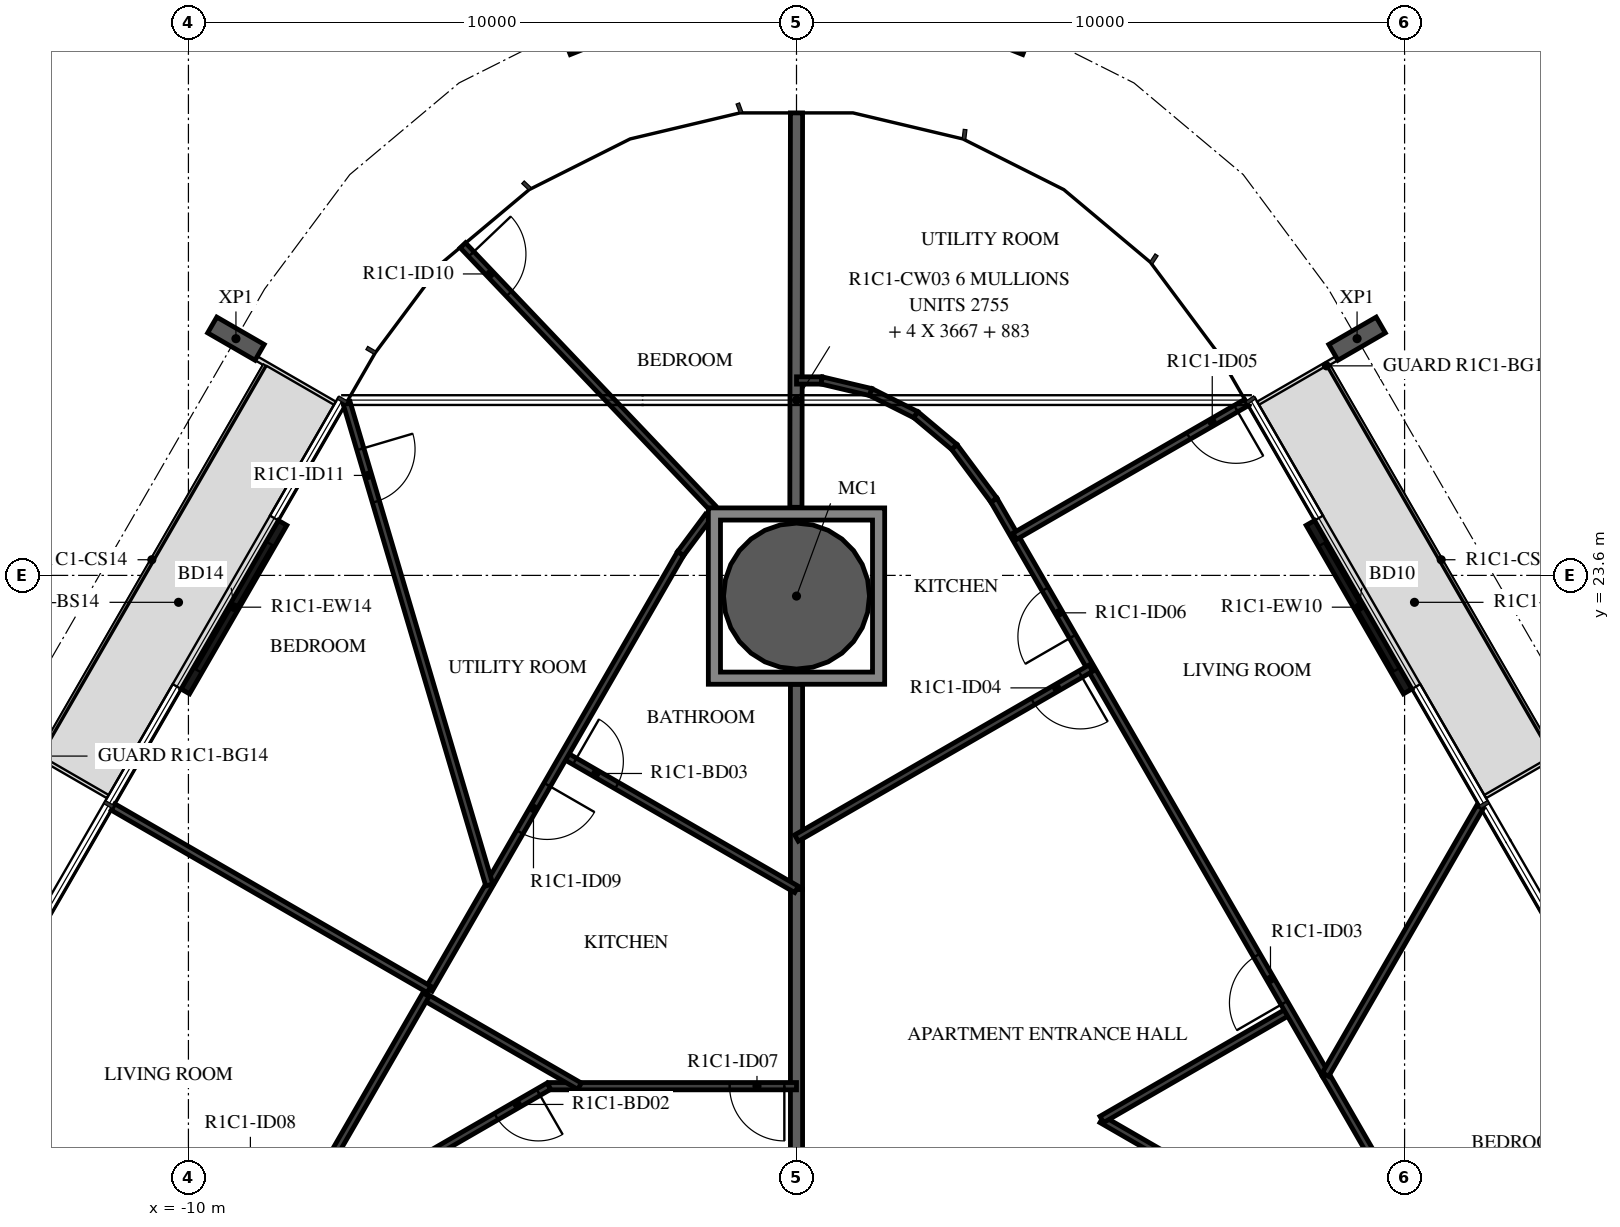
"""IFC4 building model, lengths in metres.
Left out: names, types, materials, properties, quantities, classifications, styles, units other than length and angle.
Written with IfcOpenShell. Run it as: python <this file> out.ifc"""

import sys

from ifc_helpers import new_model, si_unit, direction, frame, frame_2d, origin, origin_2d, place, context, subcontext, project, spatial, polyline, rectangle, hollow_circle, i_section, outline, extrude, element, fill, save


model = new_model("IFC4")
c1 = context("Model", 3, precision=1e-05, world=origin(), true_north=direction((0.0, 1.0)))
c2 = subcontext(c1, "Body", "Model", "MODEL_VIEW")
j1 = project(units=[si_unit("LENGTHUNIT", "METRE"), si_unit("PLANEANGLEUNIT", "RADIAN")], contexts=[c1])
p1 = place(None, origin())
s1 = spatial("IfcSite", under=j1, at=p1, CompositionType="ELEMENT")
p2 = place(p1, origin())
s2 = spatial("IfcBuilding", under=s1, at=p2, CompositionType="ELEMENT")
p3 = place(p2, frame((0.0, 0.0, 62.9)))
s3 = spatial("IfcBuildingStorey", under=s2, at=p3, CompositionType="ELEMENT", Elevation=62.9)
p4 = place(p3, frame((0.0, 23.26, -0.38), z_axis=(0.0, 0.0, 1.0), x_axis=(1.0, 0.0, 0.0)))
e1 = element("IfcColumn", 1, at=p4, inside=s3, PredefinedType="COLUMN", context=c2, shape_type="SweptSolid", body=[
    extrude(hollow_circle(Radius=1.2, WallThickness=0.06, at=origin_2d()), origin(), (0.0, 0.0, 1.0), 3.5),
])
for number, where, z_axis, x_axis in (
    (2, (9.219, 27.493, -0.38), (0.0, 0.0, 1.0), (0.5, -0.866, 0.0)),
    (3, (3.748, 32.639, -0.38), (0.0, 0.0, 1.0), (0.929, -0.371, 0.0)),
    (4, (-3.748, 32.639, -0.38), (0.0, 0.0, 1.0), (0.929, 0.371, 0.0)),
    (5, (-9.219, 27.493, -0.38), (0.0, 0.0, 1.0), (0.5, 0.866, 0.0)),
):
    element("IfcColumn", number, at=place(p3, frame(where, z_axis=z_axis, x_axis=x_axis)), inside=s3, PredefinedType="COLUMN", context=c2, shape_type="SweptSolid", body=[
        extrude(i_section(OverallWidth=0.3, OverallDepth=0.9, WebThickness=0.019, FlangeThickness=0.035, FilletRadius=0.03, at=origin_2d()), origin(), (0.0, 0.0, 1.0), 3.5),
    ])
p5 = place(p3, frame((10.051, 21.692, 0.0), z_axis=(0.0, 0.0, 1.0), x_axis=(-0.499971222258, 0.866042017984, 0.0)))
e6 = element("IfcWall", 6, at=p5, inside=s3, PredefinedType="STANDARD", context=c2, shape_type="SweptSolid", body=[
    extrude(rectangle(XDim=3.2, YDim=0.16, at=frame_2d((1.6, 0.0))), origin(), (0.0, 0.0, 1.0), 3.12),
])
p6 = place(p5, frame((0.4, 0.0, 0.0)))
e7 = element("IfcOpeningElement", 7, at=p6, cuts=e6, PredefinedType="OPENING", context=c2, shape_type="SweptSolid", body=[
    extrude(rectangle(XDim=2.4, YDim=2.4, at=frame_2d((1.2, 1.2))), frame((0.0, 0.09, 0.0), z_axis=(0.0, -1.0, 0.0), x_axis=(1.0, 0.0, 0.0)), (0.0, 0.0, 1.0), 0.18),
])
p7 = place(p3, frame((-8.451, 24.463, 0.0), z_axis=(0.0, 0.0, 1.0), x_axis=(-0.499971222258, -0.866042017984, 0.0)))
e8 = element("IfcWall", 8, at=p7, inside=s3, PredefinedType="STANDARD", context=c2, shape_type="SweptSolid", body=[
    extrude(rectangle(XDim=3.2, YDim=0.16, at=frame_2d((1.6, 0.0))), origin(), (0.0, 0.0, 1.0), 3.12),
])
p8 = place(p7, frame((0.4, 0.0, 0.0)))
e9 = element("IfcOpeningElement", 9, at=p8, cuts=e8, PredefinedType="OPENING", context=c2, shape_type="SweptSolid", body=[
    extrude(rectangle(XDim=2.4, YDim=2.4, at=frame_2d((1.2, 1.2))), frame((0.0, 0.09, 0.0), z_axis=(0.0, -1.0, 0.0), x_axis=(1.0, 0.0, 0.0)), (0.0, 0.0, 1.0), 0.18),
])
p9 = place(p3, frame((0.0, 18.437, 0.0), z_axis=(0.0, 0.0, 1.0), x_axis=(0.0, -1.0, 0.0)))
e10 = element("IfcWall", 10, at=p9, inside=s3, PredefinedType="STANDARD", context=c2, shape_type="SweptSolid", body=[
    extrude(rectangle(XDim=4.737, YDim=0.2, at=frame_2d((2.368, 0.0))), origin(), (0.0, 0.0, 1.0), 3.12),
])
p10 = place(p3, frame((0.0, 21.81, 0.0), z_axis=(0.0, 0.0, 1.0), x_axis=(0.0, -1.0, 0.0)))
e11 = element("IfcWall", 11, at=p10, inside=s3, PredefinedType="STANDARD", context=c2, shape_type="SweptSolid", body=[
    extrude(rectangle(XDim=3.373, YDim=0.2, at=frame_2d((1.687, 0.0))), origin(), (0.0, 0.0, 1.0), 3.12),
])
p11 = place(p3, frame((0.0, 31.206, 0.0), z_axis=(0.0, 0.0, 1.0), x_axis=(-0.001543266126, -0.999998809164, 0.0)))
e12 = element("IfcWall", 12, at=p11, inside=s3, PredefinedType="STANDARD", context=c2, shape_type="SweptSolid", body=[
    extrude(rectangle(XDim=6.486, YDim=0.2, at=frame_2d((3.243, 0.0))), origin(), (0.0, 0.0, 1.0), 3.12),
])
p12 = place(p3, frame((11.127, 11.127, 0.0), z_axis=(0.0, 0.0, 1.0), x_axis=(-0.86602299963, 0.500004164094, 0.0)))
e13 = element("IfcWall", 13, at=p12, inside=s3, PredefinedType="PARTITIONING", context=c2, shape_type="SweptSolid", body=[
    extrude(rectangle(XDim=7.052, YDim=0.12, at=frame_2d((3.526, 0.0))), origin(), (0.0, 0.0, 1.0), 3.12),
])
p13 = place(p12, frame((1.4, 0.0, 0.0)))
e14 = element("IfcOpeningElement", 14, at=p13, cuts=e13, PredefinedType="OPENING", context=c2, shape_type="SweptSolid", body=[
    extrude(rectangle(XDim=0.8, YDim=2.1, at=frame_2d((0.4, 1.05))), frame((0.0, 0.07, 0.0), z_axis=(0.0, -1.0, 0.0), x_axis=(1.0, 0.0, 0.0)), (0.0, 0.0, 1.0), 0.14),
])
p14 = place(p3, frame((5.02, 14.653, 0.0), z_axis=(0.0, 0.0, 1.0), x_axis=(0.866028940167, 0.499993874756, 0.0)))
e15 = element("IfcWall", 15, at=p14, inside=s3, PredefinedType="PARTITIONING", context=c2, shape_type="SweptSolid", body=[
    extrude(rectangle(XDim=3.556, YDim=0.12, at=frame_2d((1.778, 0.0))), origin(), (0.0, 0.0, 1.0), 3.12),
])
p15 = place(p3, frame((8.7, 15.392, 0.0), z_axis=(0.0, 0.0, 1.0), x_axis=(-0.500002742713, 0.866023820272, 0.0)))
e16 = element("IfcWall", 16, at=p15, inside=s3, PredefinedType="PARTITIONING", context=c2, shape_type="SweptSolid", body=[
    extrude(rectangle(XDim=10.908, YDim=0.12, at=frame_2d((5.454, 0.0))), origin(), (0.0, 0.0, 1.0), 3.12),
])
p16 = place(p15, frame((1.36, 0.0, 0.0)))
e17 = element("IfcOpeningElement", 17, at=p16, cuts=e16, PredefinedType="OPENING", context=c2, shape_type="SweptSolid", body=[
    extrude(rectangle(XDim=0.9, YDim=2.1, at=frame_2d((0.45, 1.05))), frame((0.0, 0.07, 0.0), z_axis=(0.0, -1.0, 0.0), x_axis=(1.0, 0.0, 0.0)), (0.0, 0.0, 1.0), 0.14),
])
p17 = place(p15, frame((8.317, 0.0, 0.0)))
e18 = element("IfcOpeningElement", 18, at=p17, cuts=e16, PredefinedType="OPENING", context=c2, shape_type="SweptSolid", body=[
    extrude(rectangle(XDim=0.9, YDim=2.1, at=frame_2d((0.45, 1.05))), frame((0.0, 0.07, 0.0), z_axis=(0.0, -1.0, 0.0), x_axis=(1.0, 0.0, 0.0)), (0.0, 0.0, 1.0), 0.14),
])
p18 = place(p3, frame((4.841, 22.075, 0.0), z_axis=(0.0, 0.0, 1.0), x_axis=(-0.866019751484, -0.500009789943, 0.0)))
e19 = element("IfcWall", 19, at=p18, inside=s3, PredefinedType="PARTITIONING", context=c2, shape_type="SweptSolid", body=[
    extrude(rectangle(XDim=5.59, YDim=0.12, at=frame_2d((2.795, 0.0))), origin(), (0.0, 0.0, 1.0), 3.12),
])
p19 = place(p18, frame((0.2, 0.0, 0.0)))
e20 = element("IfcOpeningElement", 20, at=p19, cuts=e19, PredefinedType="OPENING", context=c2, shape_type="SweptSolid", body=[
    extrude(rectangle(XDim=0.9, YDim=2.1, at=frame_2d((0.45, 1.05))), frame((0.0, 0.07, 0.0), z_axis=(0.0, -1.0, 0.0), x_axis=(1.0, 0.0, 0.0)), (0.0, 0.0, 1.0), 0.14),
])
p20 = place(p3, frame((8.7, 15.392, 0.0), z_axis=(0.0, 0.0, 1.0), x_axis=(0.499986106925, -0.866033424806, 0.0)))
e21 = element("IfcWall", 21, at=p20, inside=s3, PredefinedType="PARTITIONING", context=c2, shape_type="SweptSolid", body=[
    extrude(rectangle(XDim=5.317, YDim=0.12, at=frame_2d((2.659, 0.0))), origin(), (0.0, 0.0, 1.0), 3.12),
])
p21 = place(p3, frame((11.24, 19.792, 0.0), z_axis=(0.0, 0.0, 1.0), x_axis=(-0.499978956711, -0.866037552792, 0.0)))
e22 = element("IfcWall", 22, at=p21, inside=s3, PredefinedType="PARTITIONING", context=c2, shape_type="SweptSolid", body=[
    extrude(rectangle(XDim=5.081, YDim=0.12, at=frame_2d((2.541, 0.0))), origin(), (0.0, 0.0, 1.0), 3.12),
])
p22 = place(p3, frame((7.4, 26.443, 0.0), z_axis=(0.0, 0.0, 1.0), x_axis=(-0.866032203192, -0.499988222896, 0.0)))
e23 = element("IfcWall", 23, at=p22, inside=s3, PredefinedType="PARTITIONING", context=c2, shape_type="SweptSolid", body=[
    extrude(rectangle(XDim=4.4, YDim=0.12, at=frame_2d((2.2, 0.0))), origin(), (0.0, 0.0, 1.0), 2.73),
])
p23 = place(p22, frame((0.2, 0.0, 0.0)))
e24 = element("IfcOpeningElement", 24, at=p23, cuts=e23, PredefinedType="OPENING", context=c2, shape_type="SweptSolid", body=[
    extrude(rectangle(XDim=0.9, YDim=2.1, at=frame_2d((0.45, 1.05))), frame((0.0, 0.07, 0.0), z_axis=(0.0, -1.0, 0.0), x_axis=(1.0, 0.0, 0.0)), (0.0, 0.0, 1.0), 0.14),
])
p24 = place(p3, frame((0.0, 26.806, 0.0), z_axis=(0.0, 0.0, 1.0), x_axis=(1.0, 0.0, 0.0)))
e25 = element("IfcWall", 25, at=p24, inside=s3, PredefinedType="PARTITIONING", context=c2, shape_type="SweptSolid", body=[
    extrude(rectangle(XDim=0.415, YDim=0.12, at=frame_2d((0.207, 0.0))), origin(), (0.0, 0.0, 1.0), 3.12),
])
p25 = place(p3, frame((0.415, 26.806, 0.0), z_axis=(0.0, 0.0, 1.0), x_axis=(0.973048993259, -0.230598475097, 0.0)))
e26 = element("IfcWall", 26, at=p25, inside=s3, PredefinedType="PARTITIONING", context=c2, shape_type="SweptSolid", body=[
    extrude(rectangle(XDim=0.829, YDim=0.12, at=frame_2d((0.415, 0.0))), origin(), (0.0, 0.0, 1.0), 3.12),
])
for number, where, z_axis, x_axis in (
    (27, (1.221, 26.615, 0.0), (0.0, 0.0, 1.0), (0.894, -0.449, 0.0)),
    (28, (1.962, 26.243, 0.0), (0.0, 0.0, 1.0), (0.766, -0.643, 0.0)),
):
    element("IfcWall", number, at=place(p3, frame(where, z_axis=z_axis, x_axis=x_axis)), inside=s3, PredefinedType="PARTITIONING", context=c2, shape_type="SweptSolid", body=[
        extrude(rectangle(XDim=0.829, YDim=0.12, at=frame_2d((0.415, 0.0))), origin(), (0.0, 0.0, 1.0), 3.12),
    ])
p26 = place(p3, frame((2.597, 25.71, 0.0), z_axis=(0.0, 0.0, 1.0), x_axis=(0.59722925597, -0.802070580319, 0.0)))
e29 = element("IfcWall", 29, at=p26, inside=s3, PredefinedType="PARTITIONING", context=c2, shape_type="SweptSolid", body=[
    extrude(rectangle(XDim=1.087, YDim=0.12, at=frame_2d((0.543, 0.0))), origin(), (0.0, 0.0, 1.0), 3.12),
])
p27 = place(p3, frame((0.0, 15.2, 0.0), z_axis=(0.0, 0.0, 1.0), x_axis=(-1.0, 0.0, 0.0)))
e30 = element("IfcWall", 30, at=p27, inside=s3, PredefinedType="PARTITIONING", context=c2, shape_type="SweptSolid", body=[
    extrude(rectangle(XDim=4.073, YDim=0.12, at=frame_2d((2.036, 0.0))), origin(), (0.0, 0.0, 1.0), 3.12),
])
p28 = place(p27, frame((0.2, 0.0, 0.0)))
e31 = element("IfcOpeningElement", 31, at=p28, cuts=e30, PredefinedType="OPENING", context=c2, shape_type="SweptSolid", body=[
    extrude(rectangle(XDim=0.9, YDim=2.1, at=frame_2d((0.45, 1.05))), frame((0.0, 0.07, 0.0), z_axis=(0.0, -1.0, 0.0), x_axis=(1.0, 0.0, 0.0)), (0.0, 0.0, 1.0), 0.14),
])
p29 = place(p3, frame((-4.073, 15.2, 0.0), z_axis=(0.0, 0.0, 1.0), x_axis=(-0.866034514313, -0.499984219769, 0.0)))
e32 = element("IfcWall", 32, at=p29, inside=s3, PredefinedType="PARTITIONING", context=c2, shape_type="SweptSolid", body=[
    extrude(rectangle(XDim=5.006, YDim=0.12, at=frame_2d((2.503, 0.0))), origin(), (0.0, 0.0, 1.0), 3.12),
])
p30 = place(p29, frame((0.2, 0.0, 0.0)))
e33 = element("IfcOpeningElement", 33, at=p30, cuts=e32, PredefinedType="OPENING", context=c2, shape_type="SweptSolid", body=[
    extrude(rectangle(XDim=0.8, YDim=2.1, at=frame_2d((0.4, 1.05))), frame((0.0, 0.07, 0.0), z_axis=(0.0, -1.0, 0.0), x_axis=(1.0, 0.0, 0.0)), (0.0, 0.0, 1.0), 0.14),
])
p31 = place(p3, frame((-5.487, 29.028, 0.0), z_axis=(0.0, 0.0, 1.0), x_axis=(0.689189638576, -0.724581011398, 0.0)))
e34 = element("IfcWall", 34, at=p31, inside=s3, PredefinedType="PARTITIONING", context=c2, shape_type="SweptSolid", body=[
    extrude(rectangle(XDim=5.96, YDim=0.12, at=frame_2d((2.98, 0.0))), origin(), (0.0, 0.0, 1.0), 3.12),
])
p32 = place(p31, frame((0.2, 0.0, 0.0)))
e35 = element("IfcOpeningElement", 35, at=p32, cuts=e34, PredefinedType="OPENING", context=c2, shape_type="SweptSolid", body=[
    extrude(rectangle(XDim=0.9, YDim=2.1, at=frame_2d((0.45, 1.05))), frame((0.0, 0.07, 0.0), z_axis=(0.0, -1.0, 0.0), x_axis=(1.0, 0.0, 0.0)), (0.0, 0.0, 1.0), 0.14),
])
p33 = place(p3, frame((-3.821, 20.643, 0.0), z_axis=(0.0, 0.0, 1.0), x_axis=(0.866024310165, -0.5000018942, 0.0)))
e36 = element("IfcWall", 36, at=p33, inside=s3, PredefinedType="PARTITIONING", context=c2, shape_type="SweptSolid", body=[
    extrude(rectangle(XDim=4.412, YDim=0.12, at=frame_2d((2.206, 0.0))), origin(), (0.0, 0.0, 1.0), 3.12),
])
p34 = place(p33, frame((0.2, 0.0, 0.0)))
e37 = element("IfcOpeningElement", 37, at=p34, cuts=e36, PredefinedType="OPENING", context=c2, shape_type="SweptSolid", body=[
    extrude(rectangle(XDim=0.8, YDim=2.1, at=frame_2d((0.4, 1.05))), frame((0.0, 0.07, 0.0), z_axis=(0.0, -1.0, 0.0), x_axis=(1.0, 0.0, 0.0)), (0.0, 0.0, 1.0), 0.14),
])
p35 = place(p3, frame((-1.45, 24.571, 0.0), z_axis=(0.0, 0.0, 1.0), x_axis=(-0.597187509737, -0.802101663266, 0.0)))
e38 = element("IfcWall", 38, at=p35, inside=s3, PredefinedType="PARTITIONING", context=c2, shape_type="SweptSolid", body=[
    extrude(rectangle(XDim=0.765, YDim=0.12, at=frame_2d((0.382, 0.0))), origin(), (0.0, 0.0, 1.0), 3.12),
])
p36 = place(p3, frame((-1.907, 23.957, 0.0), z_axis=(0.0, 0.0, 1.0), x_axis=(-0.499994901178, -0.866028347571, 0.0)))
e39 = element("IfcWall", 39, at=p36, inside=s3, PredefinedType="PARTITIONING", context=c2, shape_type="SweptSolid", body=[
    extrude(rectangle(XDim=8.274, YDim=0.12, at=frame_2d((4.137, 0.0))), origin(), (0.0, 0.0, 1.0), 3.12),
])
p37 = place(p36, frame((4.387, 0.0, 0.0)))
e40 = element("IfcOpeningElement", 40, at=p37, cuts=e39, PredefinedType="OPENING", context=c2, shape_type="SweptSolid", body=[
    extrude(rectangle(XDim=0.9, YDim=2.1, at=frame_2d((0.45, 1.05))), frame((0.0, 0.07, 0.0), z_axis=(0.0, -1.0, 0.0), x_axis=(1.0, 0.0, 0.0)), (0.0, 0.0, 1.0), 0.14),
])
p38 = place(p3, frame((-6.114, 16.67, 0.0), z_axis=(0.0, 0.0, 1.0), x_axis=(0.866011328839, -0.500024377727, 0.0)))
e41 = element("IfcWall", 41, at=p38, inside=s3, PredefinedType="PARTITIONING", context=c2, shape_type="SweptSolid", body=[
    extrude(rectangle(XDim=2.94, YDim=0.12, at=frame_2d((1.47, 0.0))), origin(), (0.0, 0.0, 1.0), 3.12),
])
p39 = place(p3, frame((-7.4, 26.443, 0.0), z_axis=(0.0, 0.0, 1.0), x_axis=(0.283777867447, -0.95889004685, 0.0)))
e42 = element("IfcWall", 42, at=p39, inside=s3, PredefinedType="PARTITIONING", context=c2, shape_type="SweptSolid", body=[
    extrude(rectangle(XDim=8.274, YDim=0.12, at=frame_2d((4.137, 0.0))), origin(), (0.0, 0.0, 1.0), 3.12),
])
p40 = place(p39, frame((0.8, 0.0, 0.0)))
e43 = element("IfcOpeningElement", 43, at=p40, cuts=e42, PredefinedType="OPENING", context=c2, shape_type="SweptSolid", body=[
    extrude(rectangle(XDim=0.9, YDim=2.1, at=frame_2d((0.45, 1.05))), frame((0.0, 0.07, 0.0), z_axis=(0.0, -1.0, 0.0), x_axis=(1.0, 0.0, 0.0)), (0.0, 0.0, 1.0), 0.14),
])
p41 = place(p3, frame((-11.24, 19.792, 0.0), z_axis=(0.0, 0.0, 1.0), x_axis=(0.866031096941, -0.499990139034, 0.0)))
e44 = element("IfcWall", 44, at=p41, inside=s3, PredefinedType="PARTITIONING", context=c2, shape_type="SweptSolid", body=[
    extrude(rectangle(XDim=6.0, YDim=0.12, at=frame_2d((3.0, 0.0))), origin(), (0.0, 0.0, 1.0), 2.73),
])
p42 = place(p3, frame((-6.094, 16.705, 0.0), z_axis=(0.0, 0.0, 1.0), x_axis=(-0.500014747178, -0.86601688933, 0.0)))
e45 = element("IfcWall", 45, at=p42, inside=s3, PredefinedType="PARTITIONING", context=c2, shape_type="SweptSolid", body=[
    extrude(rectangle(XDim=4.627, YDim=0.12, at=frame_2d((2.313, 0.0))), origin(), (0.0, 0.0, 1.0), 3.12),
])
p43 = place(p3, origin())
e46 = element("IfcWall", 46, at=p43, inside=s3, PredefinedType="STANDARD", context=c2, shape_type="SweptSolid", body=[
    extrude(outline(polyline([(1.45, 24.71), (1.45, 21.81), (-1.45, 21.81), (-1.45, 24.71), (1.45, 24.71)]), holes=[polyline([(-1.25, 22.01), (1.25, 22.01), (1.25, 24.51), (-1.25, 24.51), (-1.25, 22.01)])]), origin(), (0.0, 0.0, 1.0), 3.12),
])
p44 = place(p6, origin())
e47 = element("IfcDoor", 47, at=p44, inside=s3, OperationType="DOUBLE_DOOR_SLIDING", PredefinedType="DOOR", context=c2, shape_type="SweptSolid", body=[
    extrude(rectangle(XDim=2.4, YDim=2.4, at=frame_2d((1.2, 1.2))), frame((0.0, 0.025, 0.0), z_axis=(0.0, -1.0, 0.0), x_axis=(1.0, 0.0, 0.0)), (0.0, 0.0, 1.0), 0.05),
])
fill(e7, e47)
p45 = place(p8, origin())
e48 = element("IfcDoor", 48, at=p45, inside=s3, OperationType="DOUBLE_DOOR_SLIDING", PredefinedType="DOOR", context=c2, shape_type="SweptSolid", body=[
    extrude(rectangle(XDim=2.4, YDim=2.4, at=frame_2d((1.2, 1.2))), frame((0.0, 0.025, 0.0), z_axis=(0.0, -1.0, 0.0), x_axis=(1.0, 0.0, 0.0)), (0.0, 0.0, 1.0), 0.05),
])
fill(e9, e48)
p46 = place(p16, origin())
e49 = element("IfcDoor", 49, at=p46, inside=s3, OperationType="SINGLE_SWING_RIGHT", PredefinedType="DOOR", context=c2, shape_type="SweptSolid", body=[
    extrude(rectangle(XDim=0.9, YDim=2.1, at=frame_2d((0.45, 1.05))), frame((0.0, 0.025, 0.0), z_axis=(0.0, -1.0, 0.0), x_axis=(1.0, 0.0, 0.0)), (0.0, 0.0, 1.0), 0.05),
])
fill(e17, e49)
p47 = place(p19, origin())
e50 = element("IfcDoor", 50, at=p47, inside=s3, OperationType="SINGLE_SWING_RIGHT", PredefinedType="DOOR", context=c2, shape_type="SweptSolid", body=[
    extrude(rectangle(XDim=0.9, YDim=2.1, at=frame_2d((0.45, 1.05))), frame((0.0, 0.025, 0.0), z_axis=(0.0, -1.0, 0.0), x_axis=(1.0, 0.0, 0.0)), (0.0, 0.0, 1.0), 0.05),
])
fill(e20, e50)
p48 = place(p23, origin())
e51 = element("IfcDoor", 51, at=p48, inside=s3, OperationType="SINGLE_SWING_RIGHT", PredefinedType="DOOR", context=c2, shape_type="SweptSolid", body=[
    extrude(rectangle(XDim=0.9, YDim=2.1, at=frame_2d((0.45, 1.05))), frame((0.0, 0.025, 0.0), z_axis=(0.0, -1.0, 0.0), x_axis=(1.0, 0.0, 0.0)), (0.0, 0.0, 1.0), 0.05),
])
fill(e24, e51)
p49 = place(p17, origin())
e52 = element("IfcDoor", 52, at=p49, inside=s3, OperationType="SINGLE_SWING_LEFT", PredefinedType="DOOR", context=c2, shape_type="SweptSolid", body=[
    extrude(rectangle(XDim=0.9, YDim=2.1, at=frame_2d((0.45, 1.05))), frame((0.0, 0.025, 0.0), z_axis=(0.0, -1.0, 0.0), x_axis=(1.0, 0.0, 0.0)), (0.0, 0.0, 1.0), 0.05),
])
fill(e18, e52)
p50 = place(p28, origin())
e53 = element("IfcDoor", 53, at=p50, inside=s3, OperationType="SINGLE_SWING_RIGHT", PredefinedType="DOOR", context=c2, shape_type="SweptSolid", body=[
    extrude(rectangle(XDim=0.9, YDim=2.1, at=frame_2d((0.45, 1.05))), frame((0.0, 0.025, 0.0), z_axis=(0.0, -1.0, 0.0), x_axis=(1.0, 0.0, 0.0)), (0.0, 0.0, 1.0), 0.05),
])
fill(e31, e53)
p51 = place(p30, origin())
e54 = element("IfcDoor", 54, at=p51, inside=s3, OperationType="SINGLE_SWING_LEFT", PredefinedType="DOOR", context=c2, shape_type="SweptSolid", body=[
    extrude(rectangle(XDim=0.8, YDim=2.1, at=frame_2d((0.4, 1.05))), frame((0.0, 0.025, 0.0), z_axis=(0.0, -1.0, 0.0), x_axis=(1.0, 0.0, 0.0)), (0.0, 0.0, 1.0), 0.05),
])
fill(e33, e54)
p52 = place(p34, origin())
e55 = element("IfcDoor", 55, at=p52, inside=s3, OperationType="SINGLE_SWING_LEFT", PredefinedType="DOOR", context=c2, shape_type="SweptSolid", body=[
    extrude(rectangle(XDim=0.8, YDim=2.1, at=frame_2d((0.4, 1.05))), frame((0.0, 0.025, 0.0), z_axis=(0.0, -1.0, 0.0), x_axis=(1.0, 0.0, 0.0)), (0.0, 0.0, 1.0), 0.05),
])
fill(e37, e55)
p53 = place(p37, origin())
e56 = element("IfcDoor", 56, at=p53, inside=s3, OperationType="SINGLE_SWING_LEFT", PredefinedType="DOOR", context=c2, shape_type="SweptSolid", body=[
    extrude(rectangle(XDim=0.9, YDim=2.1, at=frame_2d((0.45, 1.05))), frame((0.0, 0.025, 0.0), z_axis=(0.0, -1.0, 0.0), x_axis=(1.0, 0.0, 0.0)), (0.0, 0.0, 1.0), 0.05),
])
fill(e40, e56)
p54 = place(p32, origin())
e57 = element("IfcDoor", 57, at=p54, inside=s3, OperationType="SINGLE_SWING_LEFT", PredefinedType="DOOR", context=c2, shape_type="SweptSolid", body=[
    extrude(rectangle(XDim=0.9, YDim=2.1, at=frame_2d((0.45, 1.05))), frame((0.0, 0.025, 0.0), z_axis=(0.0, -1.0, 0.0), x_axis=(1.0, 0.0, 0.0)), (0.0, 0.0, 1.0), 0.05),
])
fill(e35, e57)
p55 = place(p40, origin())
e58 = element("IfcDoor", 58, at=p55, inside=s3, OperationType="SINGLE_SWING_RIGHT", PredefinedType="DOOR", context=c2, shape_type="SweptSolid", body=[
    extrude(rectangle(XDim=0.9, YDim=2.1, at=frame_2d((0.45, 1.05))), frame((0.0, 0.025, 0.0), z_axis=(0.0, -1.0, 0.0), x_axis=(1.0, 0.0, 0.0)), (0.0, 0.0, 1.0), 0.05),
])
fill(e43, e58)
save(model, sys.argv[1])
